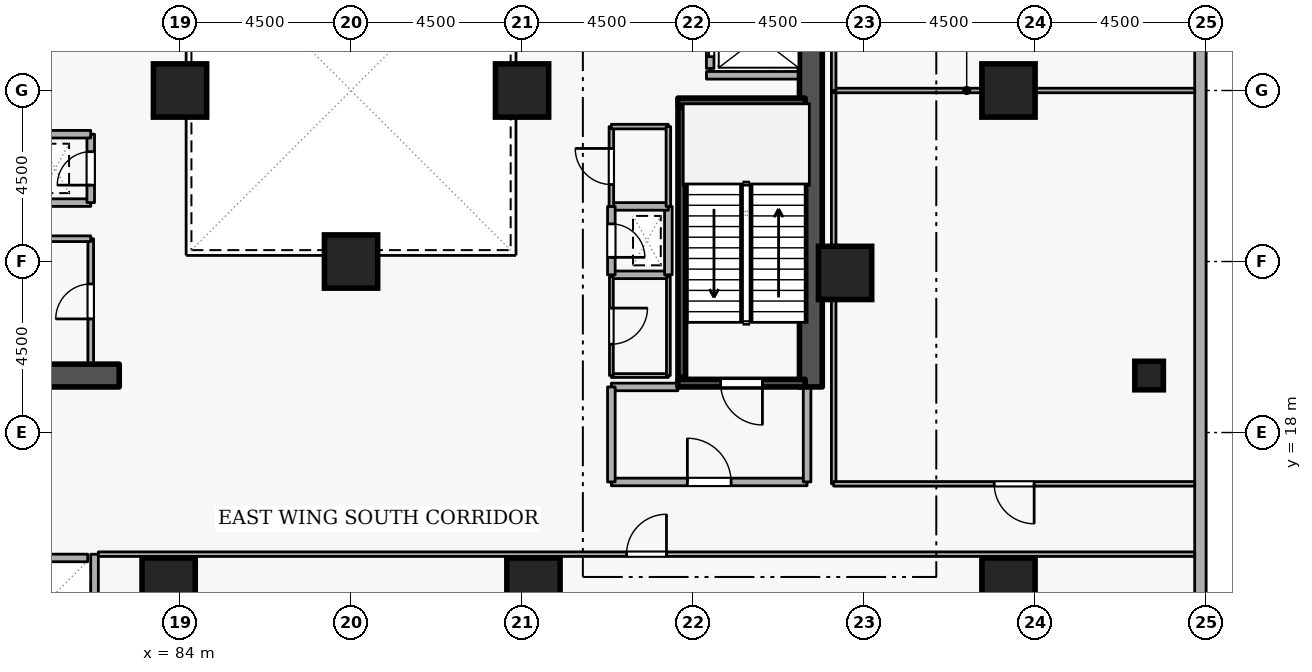
"""IFC4 building model, lengths in metres.
Left out: names, types, materials, properties, quantities, classifications, styles, units other than length and angle.
Written with IfcOpenShell. Run it as: python <this file> out.ifc"""

import sys

from ifc_helpers import new_model, si_unit, direction, frame, frame_2d, origin, origin_2d, place, context, subcontext, project, spatial, rectangle, extrude, element, fill, save


model = new_model("IFC4")
c1 = context("Model", 3, precision=1e-05, world=origin(), true_north=direction((0.0, 1.0)))
c2 = subcontext(c1, "Body", "Model", "MODEL_VIEW")
j1 = project(units=[si_unit("LENGTHUNIT", "METRE"), si_unit("PLANEANGLEUNIT", "RADIAN")], contexts=[c1])
p1 = place(None, origin())
s1 = spatial("IfcSite", under=j1, at=p1, CompositionType="ELEMENT")
p2 = place(p1, origin())
s2 = spatial("IfcBuilding", under=s1, at=p2, CompositionType="ELEMENT")
p3 = place(p2, frame((0.0, 0.0, 9.6)))
s3 = spatial("IfcBuildingStorey", under=s2, at=p3, CompositionType="ELEMENT", Elevation=9.6)
p4 = place(p3, frame((100.6, 19.2, 0.0), z_axis=(0.0, 0.0, 1.0), x_axis=(0.0, 1.0, 0.0)))
e1 = element("IfcWall", 1, at=p4, inside=s3, PredefinedType="SHEAR", context=c2, shape_type="SweptSolid", body=[
    extrude(rectangle(XDim=15.6, YDim=0.6, at=frame_2d((7.8, 0.0))), origin(), (0.0, 0.0, 1.0), 4.5),
])
p5 = place(p3, frame((76.7, 19.5, 0.0), z_axis=(0.0, 0.0, 1.0), x_axis=(1.0, 0.0, 0.0)))
e2 = element("IfcWall", 2, at=p5, inside=s3, PredefinedType="SHEAR", context=c2, shape_type="SweptSolid", body=[
    extrude(rectangle(XDim=5.7, YDim=0.6, at=frame_2d((2.85, 0.0))), origin(), (0.0, 0.0, 1.0), 4.5),
])
for number, where, z_axis, x_axis in (
    (3, (105.8, 14.0, 0.0), (0.0, 0.0, 1.0), (1.0, 0.0, 0.0)),
    (4, (105.8, 27.0, 0.0), (0.0, 0.0, 1.0), (1.0, 0.0, 0.0)),
    (5, (93.3, 14.0, 0.0), (0.0, 0.0, 1.0), (1.0, 0.0, 0.0)),
    (6, (83.7, 14.0, 0.0), (0.0, 0.0, 1.0), (1.0, 0.0, 0.0)),
    (7, (101.5, 22.2, 0.0), (0.0, 0.0, 1.0), (1.0, 0.0, 0.0)),
    (8, (93.0, 27.0, 0.0), (0.0, 0.0, 1.0), (1.0, 0.0, 0.0)),
    (9, (84.0, 27.0, 0.0), (0.0, 0.0, 1.0), (1.0, 0.0, 0.0)),
    (10, (88.5, 22.5, 0.0), (0.0, 0.0, 1.0), (1.0, 0.0, 0.0)),
):
    element("IfcColumn", number, at=place(p3, frame(where, z_axis=z_axis, x_axis=x_axis)), inside=s3, PredefinedType="COLUMN", context=c2, shape_type="SweptSolid", body=[
        extrude(rectangle(XDim=1.4, YDim=1.4, at=origin_2d()), origin(), (0.0, 0.0, 1.0), 4.5),
    ])
p6 = place(p3, frame((109.5, 19.5, 0.0), z_axis=(0.0, 0.0, 1.0), x_axis=(1.0, 0.0, 0.0)))
e11 = element("IfcColumn", 11, at=p6, inside=s3, PredefinedType="COLUMN", context=c2, shape_type="SweptSolid", body=[
    extrude(rectangle(XDim=0.75, YDim=0.75, at=origin_2d()), origin(), (0.0, 0.0, 1.0), 4.5),
])
p7 = place(p3, frame((110.85, 7.82, 0.0), z_axis=(0.0, 0.0, 1.0), x_axis=(0.0, 1.0, 0.0)))
e12 = element("IfcWall", 12, at=p7, inside=s3, PredefinedType="STANDARD", context=c2, shape_type="SweptSolid", body=[
    extrude(rectangle(XDim=41.36, YDim=0.3, at=frame_2d((20.68, 0.0))), origin(), (0.0, 0.0, 1.0), 3.56),
])
p8 = place(p3, frame((97.95, 29.22, 0.0), z_axis=(0.0, 0.0, 1.0), x_axis=(0.0, -1.0, 0.0)))
e13 = element("IfcWall", 13, at=p8, inside=s3, PredefinedType="STANDARD", context=c2, shape_type="SweptSolid", body=[
    extrude(rectangle(XDim=1.64, YDim=0.2, at=frame_2d((0.82, 0.0))), origin(), (0.0, 0.0, 1.0), 4.16),
])
p9 = place(p8, frame((0.31, 0.0, 0.0)))
e14 = element("IfcOpeningElement", 14, at=p9, cuts=e13, PredefinedType="OPENING", context=c2, shape_type="SweptSolid", body=[
    extrude(rectangle(XDim=1.02, YDim=2.06, at=frame_2d((0.51, 1.03))), frame((0.0, 0.11, 0.0), z_axis=(0.0, -1.0, 0.0), x_axis=(1.0, 0.0, 0.0)), (0.0, 0.0, 1.0), 0.22),
])
p10 = place(p3, frame((79.63, 14.7, 0.0), z_axis=(0.0, 0.0, 1.0), x_axis=(1.0, 0.0, 0.0)))
e15 = element("IfcWall", 15, at=p10, inside=s3, PredefinedType="STANDARD", context=c2, shape_type="SweptSolid", body=[
    extrude(rectangle(XDim=1.94, YDim=0.2, at=frame_2d((0.97, 0.0))), origin(), (0.0, 0.0, 1.0), 4.16),
])
p11 = place(p3, frame((97.852, 27.4, 0.0), z_axis=(0.0, 0.0, 1.0), x_axis=(1.0, 0.0, 0.0)))
e16 = element("IfcWall", 16, at=p11, inside=s3, PredefinedType="STANDARD", context=c2, shape_type="SweptSolid", body=[
    extrude(rectangle(XDim=2.436, YDim=0.2, at=frame_2d((1.218, 0.0))), origin(), (0.0, 0.0, 1.0), 4.16),
])
p12 = place(p3, frame((81.75, 12.612, 0.0), z_axis=(0.0, 0.0, 1.0), x_axis=(0.0, 1.0, 0.0)))
e17 = element("IfcWall", 17, at=p12, inside=s3, PredefinedType="STANDARD", context=c2, shape_type="SweptSolid", body=[
    extrude(rectangle(XDim=2.186, YDim=0.2, at=frame_2d((1.093, 0.0))), origin(), (0.0, 0.0, 1.0), 4.16),
])
p13 = place(p3, frame((100.45, 19.3, 0.0), z_axis=(0.0, 0.0, 1.0), x_axis=(-1.0, 0.0, 0.0)))
e18 = element("IfcWall", 18, at=p13, inside=s3, PredefinedType="SHEAR", context=c2, shape_type="SweptSolid", body=[
    extrude(rectangle(XDim=3.35, YDim=0.2, at=frame_2d((1.675, 0.0))), origin(), (0.0, 0.0, 1.0), 4.5),
])
p14 = place(p13, frame((1.125, 0.0, 0.0)))
e19 = element("IfcOpeningElement", 19, at=p14, cuts=e18, PredefinedType="OPENING", context=c2, shape_type="SweptSolid", body=[
    extrude(rectangle(XDim=1.1, YDim=2.1, at=frame_2d((0.55, 1.05))), frame((0.0, 0.11, 0.0), z_axis=(0.0, -1.0, 0.0), x_axis=(1.0, 0.0, 0.0)), (0.0, 0.0, 1.0), 0.22),
])
p15 = place(p3, frame((97.1, 26.7, 0.0), z_axis=(0.0, 0.0, 1.0), x_axis=(1.0, 0.0, 0.0)))
e20 = element("IfcWall", 20, at=p15, inside=s3, PredefinedType="SHEAR", context=c2, shape_type="SweptSolid", body=[
    extrude(rectangle(XDim=3.35, YDim=0.2, at=frame_2d((1.675, 0.0))), origin(), (0.0, 0.0, 1.0), 4.5),
])
p16 = place(p3, frame((97.203, 26.55, 0.0), z_axis=(0.0, 0.0, 1.0), x_axis=(0.0, -1.0, 0.0)))
e21 = element("IfcWall", 21, at=p16, inside=s3, PredefinedType="SHEAR", context=c2, shape_type="SweptSolid", body=[
    extrude(rectangle(XDim=7.1, YDim=0.2, at=frame_2d((3.55, 0.0))), origin(), (0.0, 0.0, 1.0), 4.5),
])
p17 = place(p3, frame((95.35, 16.7, 0.0), z_axis=(0.0, 0.0, 1.0), x_axis=(1.0, 0.0, 0.0)))
e22 = element("IfcWall", 22, at=p17, inside=s3, PredefinedType="STANDARD", context=c2, shape_type="SweptSolid", body=[
    extrude(rectangle(XDim=5.15, YDim=0.2, at=frame_2d((2.575, 0.0))), origin(), (0.0, 0.0, 1.0), 4.16),
])
p18 = place(p17, frame((2.0, 0.0, 0.0)))
e23 = element("IfcOpeningElement", 23, at=p18, cuts=e22, PredefinedType="OPENING", context=c2, shape_type="SweptSolid", body=[
    extrude(rectangle(XDim=1.15, YDim=2.1, at=frame_2d((0.575, 1.05))), frame((0.0, 0.11, 0.0), z_axis=(0.0, -1.0, 0.0), x_axis=(1.0, 0.0, 0.0)), (0.0, 0.0, 1.0), 0.22),
])
p19 = place(p3, frame((100.5, 16.7, 0.0), z_axis=(0.0, 0.0, 1.0), x_axis=(0.0, 1.0, 0.0)))
e24 = element("IfcWall", 24, at=p19, inside=s3, PredefinedType="STANDARD", context=c2, shape_type="SweptSolid", body=[
    extrude(rectangle(XDim=2.5, YDim=0.2, at=frame_2d((1.25, 0.0))), origin(), (0.0, 0.0, 1.0), 4.16),
])
p20 = place(p3, frame((97.1, 19.2, 0.0), z_axis=(0.0, 0.0, 1.0), x_axis=(-1.0, 0.0, 0.0)))
e25 = element("IfcWall", 25, at=p20, inside=s3, PredefinedType="STANDARD", context=c2, shape_type="SweptSolid", body=[
    extrude(rectangle(XDim=1.75, YDim=0.2, at=frame_2d((0.875, 0.0))), origin(), (0.0, 0.0, 1.0), 3.365),
])
p21 = place(p3, frame((95.35, 19.2, 0.0), z_axis=(0.0, 0.0, 1.0), x_axis=(0.0, -1.0, 0.0)))
e26 = element("IfcWall", 26, at=p21, inside=s3, PredefinedType="STANDARD", context=c2, shape_type="SweptSolid", body=[
    extrude(rectangle(XDim=2.5, YDim=0.2, at=frame_2d((1.25, 0.0))), origin(), (0.0, 0.0, 1.0), 4.16),
])
p22 = place(p3, frame((95.35, 22.15, 0.0), z_axis=(0.0, 0.0, 1.0), x_axis=(1.0, 0.0, 0.0)))
e27 = element("IfcWall", 27, at=p22, inside=s3, PredefinedType="STANDARD", context=c2, shape_type="SweptSolid", body=[
    extrude(rectangle(XDim=1.5, YDim=0.2, at=frame_2d((0.75, 0.0))), origin(), (0.0, 0.0, 1.0), 4.16),
])
p23 = place(p3, frame((96.85, 22.15, 0.0), z_axis=(0.0, 0.0, 1.0), x_axis=(0.0, 1.0, 0.0)))
e28 = element("IfcWall", 28, at=p23, inside=s3, PredefinedType="STANDARD", context=c2, shape_type="SweptSolid", body=[
    extrude(rectangle(XDim=1.8, YDim=0.2, at=frame_2d((0.9, 0.0))), origin(), (0.0, 0.0, 1.0), 4.16),
])
p24 = place(p3, frame((96.85, 23.95, 0.0), z_axis=(0.0, 0.0, 1.0), x_axis=(-1.0, 0.0, 0.0)))
e29 = element("IfcWall", 29, at=p24, inside=s3, PredefinedType="STANDARD", context=c2, shape_type="SweptSolid", body=[
    extrude(rectangle(XDim=1.5, YDim=0.2, at=frame_2d((0.75, 0.0))), origin(), (0.0, 0.0, 1.0), 4.16),
])
p25 = place(p3, frame((95.35, 23.95, 0.0), z_axis=(0.0, 0.0, 1.0), x_axis=(0.0, -1.0, 0.0)))
e30 = element("IfcWall", 30, at=p25, inside=s3, PredefinedType="STANDARD", context=c2, shape_type="SweptSolid", body=[
    extrude(rectangle(XDim=1.8, YDim=0.2, at=frame_2d((0.9, 0.0))), origin(), (0.0, 0.0, 1.0), 4.16),
])
p26 = place(p25, frame((0.46, 0.0, 0.0)))
e31 = element("IfcOpeningElement", 31, at=p26, cuts=e30, PredefinedType="OPENING", context=c2, shape_type="SweptSolid", body=[
    extrude(rectangle(XDim=0.88, YDim=2.04, at=frame_2d((0.44, 1.02))), frame((0.0, 0.11, 0.0), z_axis=(0.0, -1.0, 0.0), x_axis=(1.0, 0.0, 0.0)), (0.0, 0.0, 1.0), 0.22),
])
p27 = place(p3, frame((80.15, 24.05, 0.0), z_axis=(0.0, 0.0, 1.0), x_axis=(1.0, 0.0, 0.0)))
e32 = element("IfcWall", 32, at=p27, inside=s3, PredefinedType="STANDARD", context=c2, shape_type="SweptSolid", body=[
    extrude(rectangle(XDim=1.5, YDim=0.2, at=frame_2d((0.75, 0.0))), origin(), (0.0, 0.0, 1.0), 4.16),
])
p28 = place(p3, frame((81.65, 24.05, 0.0), z_axis=(0.0, 0.0, 1.0), x_axis=(0.0, 1.0, 0.0)))
e33 = element("IfcWall", 33, at=p28, inside=s3, PredefinedType="STANDARD", context=c2, shape_type="SweptSolid", body=[
    extrude(rectangle(XDim=1.8, YDim=0.2, at=frame_2d((0.9, 0.0))), origin(), (0.0, 0.0, 1.0), 4.16),
])
p29 = place(p28, frame((0.46, 0.0, 0.0)))
e34 = element("IfcOpeningElement", 34, at=p29, cuts=e33, PredefinedType="OPENING", context=c2, shape_type="SweptSolid", body=[
    extrude(rectangle(XDim=0.88, YDim=2.04, at=frame_2d((0.44, 1.02))), frame((0.0, 0.11, 0.0), z_axis=(0.0, -1.0, 0.0), x_axis=(1.0, 0.0, 0.0)), (0.0, 0.0, 1.0), 0.22),
])
p30 = place(p3, frame((81.65, 25.85, 0.0), z_axis=(0.0, 0.0, 1.0), x_axis=(-1.0, 0.0, 0.0)))
e35 = element("IfcWall", 35, at=p30, inside=s3, PredefinedType="STANDARD", context=c2, shape_type="SweptSolid", body=[
    extrude(rectangle(XDim=1.5, YDim=0.2, at=frame_2d((0.75, 0.0))), origin(), (0.0, 0.0, 1.0), 4.16),
])
p31 = place(p3, frame((95.35, 19.5, 0.0), z_axis=(0.0, 0.0, 1.0), x_axis=(1.0, 0.0, 0.0)))
e36 = element("IfcWall", 36, at=p31, inside=s3, PredefinedType="PARTITIONING", context=c2, shape_type="SweptSolid", body=[
    extrude(rectangle(XDim=1.5, YDim=0.1, at=frame_2d((0.75, 0.0))), origin(), (0.0, 0.0, 1.0), 3.365),
])
p32 = place(p3, frame((96.85, 19.5, 0.0), z_axis=(0.0, 0.0, 1.0), x_axis=(0.0, 1.0, 0.0)))
e37 = element("IfcWall", 37, at=p32, inside=s3, PredefinedType="PARTITIONING", context=c2, shape_type="SweptSolid", body=[
    extrude(rectangle(XDim=2.6, YDim=0.1, at=frame_2d((1.3, 0.0))), origin(), (0.0, 0.0, 1.0), 4.16),
])
p33 = place(p3, frame((95.35, 22.1, 0.0), z_axis=(0.0, 0.0, 1.0), x_axis=(0.0, -1.0, 0.0)))
e38 = element("IfcWall", 38, at=p33, inside=s3, PredefinedType="PARTITIONING", context=c2, shape_type="SweptSolid", body=[
    extrude(rectangle(XDim=2.6, YDim=0.1, at=frame_2d((1.3, 0.0))), origin(), (0.0, 0.0, 1.0), 4.16),
])
p34 = place(p33, frame((0.825, 0.0, 0.0)))
e39 = element("IfcOpeningElement", 39, at=p34, cuts=e38, PredefinedType="OPENING", context=c2, shape_type="SweptSolid", body=[
    extrude(rectangle(XDim=0.95, YDim=2.1, at=frame_2d((0.475, 1.05))), frame((0.0, 0.06, 0.0), z_axis=(0.0, -1.0, 0.0), x_axis=(1.0, 0.0, 0.0)), (0.0, 0.0, 1.0), 0.12),
])
p35 = place(p3, frame((95.35, 23.95, 0.0), z_axis=(0.0, 0.0, 1.0), x_axis=(0.0, 1.0, 0.0)))
e40 = element("IfcWall", 40, at=p35, inside=s3, PredefinedType="PARTITIONING", context=c2, shape_type="SweptSolid", body=[
    extrude(rectangle(XDim=2.1, YDim=0.12, at=frame_2d((1.05, 0.0))), origin(), (0.0, 0.0, 1.0), 4.16),
])
p36 = place(p35, frame((0.575, 0.0, 0.0)))
e41 = element("IfcOpeningElement", 41, at=p36, cuts=e40, PredefinedType="OPENING", context=c2, shape_type="SweptSolid", body=[
    extrude(rectangle(XDim=0.95, YDim=2.1, at=frame_2d((0.475, 1.05))), frame((0.0, 0.07, 0.0), z_axis=(0.0, -1.0, 0.0), x_axis=(1.0, 0.0, 0.0)), (0.0, 0.0, 1.0), 0.14),
])
p37 = place(p3, frame((95.35, 26.05, 0.0), z_axis=(0.0, 0.0, 1.0), x_axis=(1.0, 0.0, 0.0)))
e42 = element("IfcWall", 42, at=p37, inside=s3, PredefinedType="PARTITIONING", context=c2, shape_type="SweptSolid", body=[
    extrude(rectangle(XDim=1.5, YDim=0.12, at=frame_2d((0.75, 0.0))), origin(), (0.0, 0.0, 1.0), 4.16),
])
p38 = place(p3, frame((96.85, 26.05, 0.0), z_axis=(0.0, 0.0, 1.0), x_axis=(0.0, -1.0, 0.0)))
e43 = element("IfcWall", 43, at=p38, inside=s3, PredefinedType="PARTITIONING", context=c2, shape_type="SweptSolid", body=[
    extrude(rectangle(XDim=2.1, YDim=0.12, at=frame_2d((1.05, 0.0))), origin(), (0.0, 0.0, 1.0), 4.16),
])
p39 = place(p3, frame((81.65, 19.8, 0.0), z_axis=(0.0, 0.0, 1.0), x_axis=(0.0, 1.0, 0.0)))
e44 = element("IfcWall", 44, at=p39, inside=s3, PredefinedType="PARTITIONING", context=c2, shape_type="SweptSolid", body=[
    extrude(rectangle(XDim=3.3, YDim=0.15, at=frame_2d((1.65, 0.0))), origin(), (0.0, 0.0, 1.0), 4.16),
])
p40 = place(p39, frame((1.19, 0.0, 0.0)))
e45 = element("IfcOpeningElement", 45, at=p40, cuts=e44, PredefinedType="OPENING", context=c2, shape_type="SweptSolid", body=[
    extrude(rectangle(XDim=0.92, YDim=2.08, at=frame_2d((0.46, 1.04))), frame((0.0, 0.085, 0.0), z_axis=(0.0, -1.0, 0.0), x_axis=(1.0, 0.0, 0.0)), (0.0, 0.0, 1.0), 0.17),
])
p41 = place(p3, frame((81.65, 23.1, 0.0), z_axis=(0.0, 0.0, 1.0), x_axis=(-1.0, 0.0, 0.0)))
e46 = element("IfcWall", 46, at=p41, inside=s3, PredefinedType="PARTITIONING", context=c2, shape_type="SweptSolid", body=[
    extrude(rectangle(XDim=1.5, YDim=0.15, at=frame_2d((0.75, 0.0))), origin(), (0.0, 0.0, 1.0), 4.16),
])
p42 = place(p3, frame((101.2, 16.65, 0.0), z_axis=(0.0, 0.0, 1.0), x_axis=(0.0, 1.0, 0.0)))
e47 = element("IfcWall", 47, at=p42, inside=s3, PredefinedType="PARTITIONING", context=c2, shape_type="SweptSolid", body=[
    extrude(rectangle(XDim=10.35, YDim=0.12, at=frame_2d((5.175, 0.0))), origin(), (0.0, 0.0, 1.0), 4.16),
])
p43 = place(p3, frame((101.2, 27.0, 0.0), z_axis=(0.0, 0.0, 1.0), x_axis=(1.0, 0.0, 0.0)))
e48 = element("IfcWall", 48, at=p43, inside=s3, PredefinedType="PARTITIONING", context=c2, shape_type="SweptSolid", body=[
    extrude(rectangle(XDim=9.5, YDim=0.12, at=frame_2d((4.75, 0.0))), origin(), (0.0, 0.0, 1.0), 4.16),
])
p44 = place(p3, frame((110.7, 16.65, 0.0), z_axis=(0.0, 0.0, 1.0), x_axis=(-1.0, 0.0, 0.0)))
e49 = element("IfcWall", 49, at=p44, inside=s3, PredefinedType="PARTITIONING", context=c2, shape_type="SweptSolid", body=[
    extrude(rectangle(XDim=9.5, YDim=0.12, at=frame_2d((4.75, 0.0))), origin(), (0.0, 0.0, 1.0), 4.16),
])
p45 = place(p44, frame((4.225, 0.0, 0.0)))
e50 = element("IfcOpeningElement", 50, at=p45, cuts=e49, PredefinedType="OPENING", context=c2, shape_type="SweptSolid", body=[
    extrude(rectangle(XDim=1.05, YDim=2.1, at=frame_2d((0.525, 1.05))), frame((0.0, 0.07, 0.0), z_axis=(0.0, -1.0, 0.0), x_axis=(1.0, 0.0, 0.0)), (0.0, 0.0, 1.0), 0.14),
])
p46 = place(p3, frame((101.2, 27.0, 0.0), z_axis=(0.0, 0.0, 1.0), x_axis=(0.0, 1.0, 0.0)))
e51 = element("IfcWall", 51, at=p46, inside=s3, PredefinedType="PARTITIONING", context=c2, shape_type="SweptSolid", body=[
    extrude(rectangle(XDim=13.8, YDim=0.12, at=frame_2d((6.9, 0.0))), origin(), (0.0, 0.0, 1.0), 4.16),
])
p47 = place(p3, frame((81.85, 14.8, 0.0), z_axis=(0.0, 0.0, 1.0), x_axis=(1.0, 0.0, 0.0)))
e52 = element("IfcWall", 52, at=p47, inside=s3, PredefinedType="PARTITIONING", context=c2, shape_type="SweptSolid", body=[
    extrude(rectangle(XDim=28.85, YDim=0.12, at=frame_2d((14.425, 0.0))), origin(), (0.0, 0.0, 1.0), 4.16),
])
p48 = place(p47, frame((13.9, 0.0, 0.0)))
e53 = element("IfcOpeningElement", 53, at=p48, cuts=e52, PredefinedType="OPENING", context=c2, shape_type="SweptSolid", body=[
    extrude(rectangle(XDim=1.05, YDim=2.1, at=frame_2d((0.525, 1.05))), frame((0.0, 0.07, 0.0), z_axis=(0.0, -1.0, 0.0), x_axis=(1.0, 0.0, 0.0)), (0.0, 0.0, 1.0), 0.14),
])
p49 = place(p9, origin())
e54 = element("IfcDoor", 54, at=p49, inside=s3, OperationType="SLIDING_TO_LEFT", PredefinedType="DOOR", context=c2, shape_type="SweptSolid", body=[
    extrude(rectangle(XDim=1.02, YDim=2.06, at=frame_2d((0.51, 1.03))), frame((0.0, 0.025, 0.0), z_axis=(0.0, -1.0, 0.0), x_axis=(1.0, 0.0, 0.0)), (0.0, 0.0, 1.0), 0.05),
])
fill(e14, e54)
p50 = place(p14, origin())
e55 = element("IfcDoor", 55, at=p50, inside=s3, OperationType="SINGLE_SWING_LEFT", PredefinedType="DOOR", context=c2, shape_type="SweptSolid", body=[
    extrude(rectangle(XDim=1.1, YDim=2.1, at=frame_2d((0.55, 1.05))), frame((0.0, 0.025, 0.0), z_axis=(0.0, -1.0, 0.0), x_axis=(1.0, 0.0, 0.0)), (0.0, 0.0, 1.0), 0.05),
])
fill(e19, e55)
p51 = place(p18, origin())
e56 = element("IfcDoor", 56, at=p51, inside=s3, OperationType="SINGLE_SWING_LEFT", PredefinedType="DOOR", context=c2, shape_type="SweptSolid", body=[
    extrude(rectangle(XDim=1.15, YDim=2.1, at=frame_2d((0.575, 1.05))), frame((0.0, 0.025, 0.0), z_axis=(0.0, -1.0, 0.0), x_axis=(1.0, 0.0, 0.0)), (0.0, 0.0, 1.0), 0.05),
])
fill(e23, e56)
p52 = place(p26, origin())
e57 = element("IfcDoor", 57, at=p52, inside=s3, OperationType="SINGLE_SWING_RIGHT", PredefinedType="DOOR", context=c2, shape_type="SweptSolid", body=[
    extrude(rectangle(XDim=0.88, YDim=2.04, at=frame_2d((0.44, 1.02))), frame((0.0, 0.025, 0.0), z_axis=(0.0, -1.0, 0.0), x_axis=(1.0, 0.0, 0.0)), (0.0, 0.0, 1.0), 0.05),
])
fill(e31, e57)
p53 = place(p29, origin())
e58 = element("IfcDoor", 58, at=p53, inside=s3, OperationType="SINGLE_SWING_LEFT", PredefinedType="DOOR", context=c2, shape_type="SweptSolid", body=[
    extrude(rectangle(XDim=0.88, YDim=2.04, at=frame_2d((0.44, 1.02))), frame((0.0, 0.025, 0.0), z_axis=(0.0, -1.0, 0.0), x_axis=(1.0, 0.0, 0.0)), (0.0, 0.0, 1.0), 0.05),
])
fill(e34, e58)
p54 = place(p34, origin())
e59 = element("IfcDoor", 59, at=p54, inside=s3, OperationType="SINGLE_SWING_LEFT", PredefinedType="DOOR", context=c2, shape_type="SweptSolid", body=[
    extrude(rectangle(XDim=0.95, YDim=2.1, at=frame_2d((0.475, 1.05))), frame((0.0, 0.025, 0.0), z_axis=(0.0, -1.0, 0.0), x_axis=(1.0, 0.0, 0.0)), (0.0, 0.0, 1.0), 0.05),
])
fill(e39, e59)
p55 = place(p36, origin())
e60 = element("IfcDoor", 60, at=p55, inside=s3, OperationType="SINGLE_SWING_RIGHT", PredefinedType="DOOR", context=c2, shape_type="SweptSolid", body=[
    extrude(rectangle(XDim=0.95, YDim=2.1, at=frame_2d((0.475, 1.05))), frame((0.0, 0.025, 0.0), z_axis=(0.0, -1.0, 0.0), x_axis=(1.0, 0.0, 0.0)), (0.0, 0.0, 1.0), 0.05),
])
fill(e41, e60)
p56 = place(p40, origin())
e61 = element("IfcDoor", 61, at=p56, inside=s3, OperationType="SINGLE_SWING_LEFT", PredefinedType="DOOR", context=c2, shape_type="SweptSolid", body=[
    extrude(rectangle(XDim=0.92, YDim=2.08, at=frame_2d((0.46, 1.04))), frame((0.0, 0.025, 0.0), z_axis=(0.0, -1.0, 0.0), x_axis=(1.0, 0.0, 0.0)), (0.0, 0.0, 1.0), 0.05),
])
fill(e45, e61)
p57 = place(p45, origin())
e62 = element("IfcDoor", 62, at=p57, inside=s3, OperationType="SINGLE_SWING_LEFT", PredefinedType="DOOR", context=c2, shape_type="SweptSolid", body=[
    extrude(rectangle(XDim=1.05, YDim=2.1, at=frame_2d((0.525, 1.05))), frame((0.0, 0.025, 0.0), z_axis=(0.0, -1.0, 0.0), x_axis=(1.0, 0.0, 0.0)), (0.0, 0.0, 1.0), 0.05),
])
fill(e50, e62)
p58 = place(p48, origin())
e63 = element("IfcDoor", 63, at=p58, inside=s3, OperationType="SINGLE_SWING_RIGHT", PredefinedType="DOOR", context=c2, shape_type="SweptSolid", body=[
    extrude(rectangle(XDim=1.05, YDim=2.1, at=frame_2d((0.525, 1.05))), frame((0.0, 0.025, 0.0), z_axis=(0.0, -1.0, 0.0), x_axis=(1.0, 0.0, 0.0)), (0.0, 0.0, 1.0), 0.05),
])
fill(e53, e63)
save(model, sys.argv[1])
